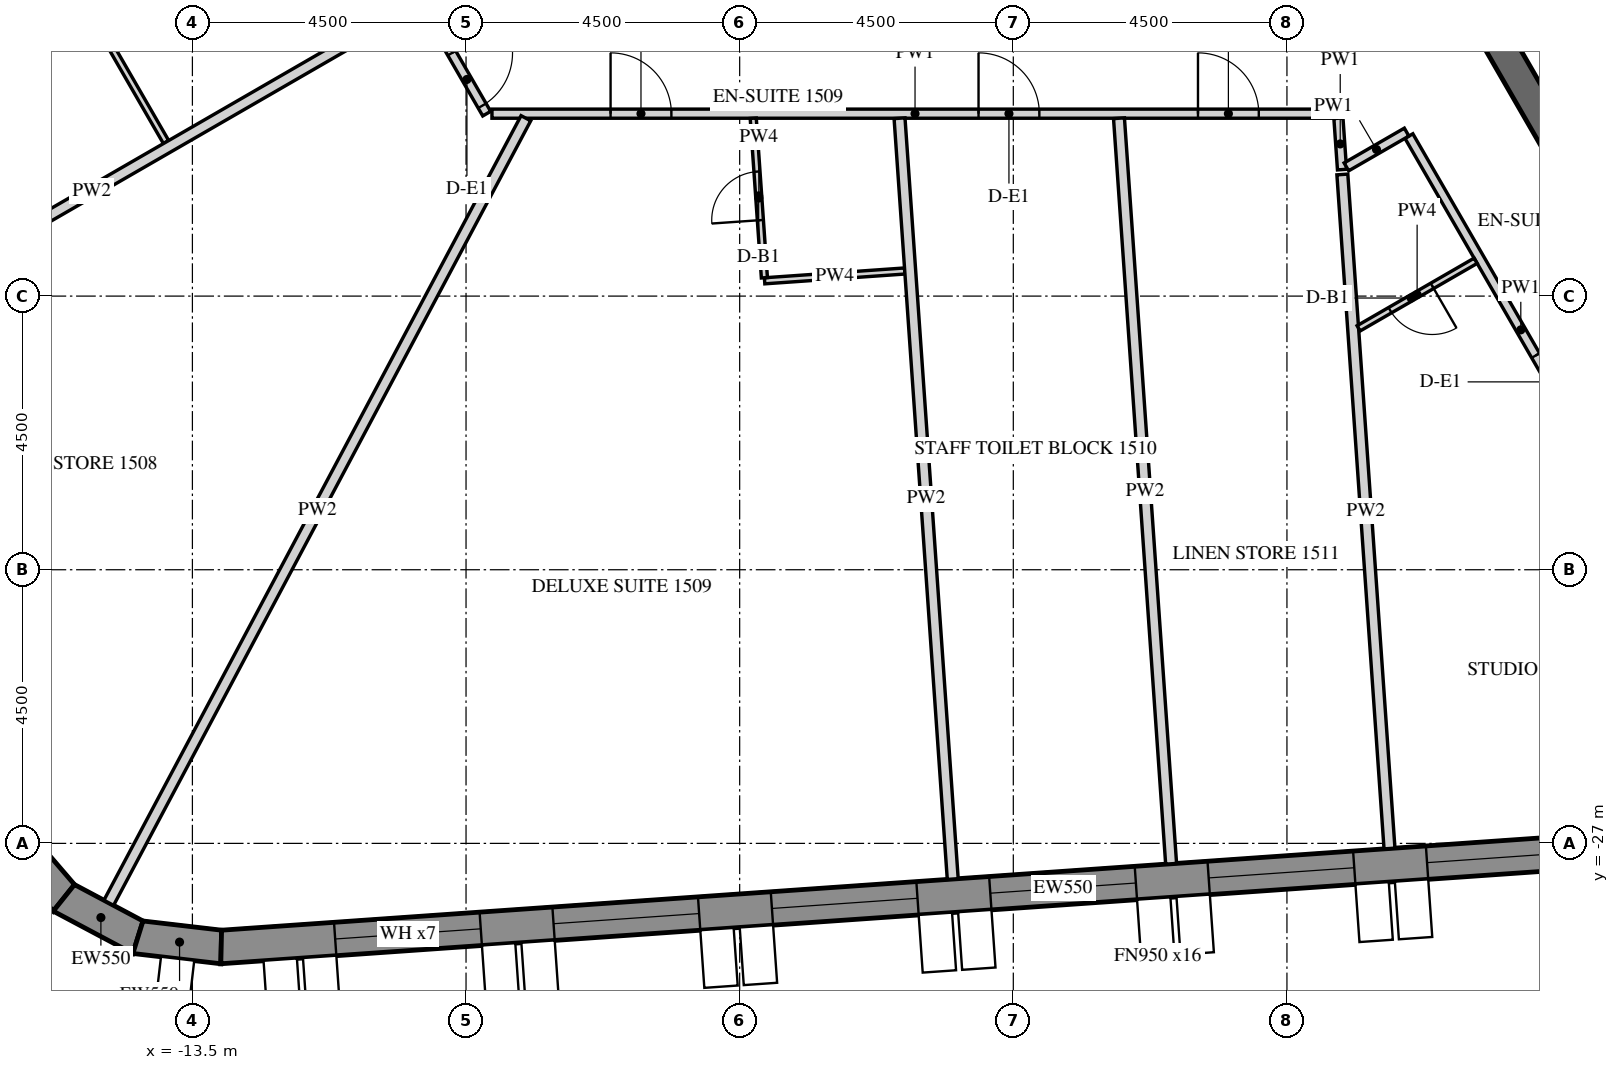
"""IFC4 building model, lengths in metres.
Left out: names, types, materials, properties, quantities, classifications, styles, units other than length and angle.
Written with IfcOpenShell. Run it as: python <this file> out.ifc"""

import sys

from ifc_helpers import new_model, si_unit, direction, frame, frame_2d, origin, place, context, subcontext, project, spatial, polyline, rectangle, outline, extrude, element, fill, save


model = new_model("IFC4")
c1 = context("Model", 3, precision=1e-05, world=origin(), true_north=direction((0.0, 1.0)))
c2 = subcontext(c1, "Body", "Model", "MODEL_VIEW")
j1 = project(units=[si_unit("LENGTHUNIT", "METRE"), si_unit("PLANEANGLEUNIT", "RADIAN")], contexts=[c1])
p1 = place(None, origin())
s1 = spatial("IfcSite", under=j1, at=p1, CompositionType="ELEMENT")
p2 = place(p1, origin())
s2 = spatial("IfcBuilding", under=s1, at=p2, CompositionType="ELEMENT")
p3 = place(p2, frame((0.0, 0.0, 195.6)))
s3 = spatial("IfcBuildingStorey", under=s2, at=p3, CompositionType="ELEMENT", Elevation=195.6)
p4 = place(p3, frame((-16.512, -26.85, -0.15), z_axis=(0.0, 0.0, 1.0), x_axis=(0.651621950847, -0.758543890078, 0.0)))
e1 = element("IfcWall", 1, at=p4, inside=s3, PredefinedType="SOLIDWALL", context=c2, shape_type="SweptSolid", body=[
    extrude(outline(polyline([(-0.026, -0.275), (1.431, -0.275), (1.327, 0.275), (0.026, 0.275), (-0.026, -0.275)])), origin(), (0.0, 0.0, 1.0), 3.9),
])
p5 = place(p3, frame((-15.614, -27.896, -0.15), z_axis=(0.0, 0.0, 1.0), x_axis=(0.882994189209, -0.469383917304, 0.0)))
e2 = element("IfcWall", 2, at=p5, inside=s3, PredefinedType="SOLIDWALL", context=c2, shape_type="SweptSolid", body=[
    extrude(outline(polyline([(-0.052, -0.275), (1.431, -0.275), (1.327, 0.275), (0.052, 0.275), (-0.052, -0.275)])), origin(), (0.0, 0.0, 1.0), 3.9),
])
p6 = place(p3, frame((-14.396, -28.543, -0.15), z_axis=(0.0, 0.0, 1.0), x_axis=(0.993232537394, -0.11614269956, 0.0)))
e3 = element("IfcWall", 3, at=p6, inside=s3, PredefinedType="SOLIDWALL", context=c2, shape_type="SweptSolid", body=[
    extrude(outline(polyline([(-0.052, -0.275), (1.405, -0.275), (1.353, 0.275), (0.052, 0.275), (-0.052, -0.275)])), origin(), (0.0, 0.0, 1.0), 3.9),
])
p7 = place(p3, frame((-13.026, -28.704, -0.15), z_axis=(0.0, 0.0, 1.0), x_axis=(0.99756406806, 0.069756219185, 0.0)))
e4 = element("IfcWall", 4, at=p7, inside=s3, PredefinedType="SOLIDWALL", context=c2, shape_type="SweptSolid", body=[
    extrude(outline(polyline([(-0.026, -0.275), (27.78, -0.275), (27.735, 0.275), (0.026, 0.275), (-0.026, -0.275)])), origin(), (0.0, 0.0, 1.0), 3.9),
])
p8 = place(p7, frame((1.879, 0.0, 1.05)))
e5 = element("IfcOpeningElement", 5, at=p8, cuts=e4, PredefinedType="OPENING", context=c2, shape_type="SweptSolid", body=[
    extrude(rectangle(XDim=2.4, YDim=2.4, at=frame_2d((1.2, 1.2))), frame((0.0, 0.285, 0.0), z_axis=(0.0, -1.0, 0.0), x_axis=(1.0, 0.0, 0.0)), (0.0, 0.0, 1.0), 0.57),
])
p9 = place(p7, frame((5.479, 0.0, 1.05)))
e6 = element("IfcOpeningElement", 6, at=p9, cuts=e4, PredefinedType="OPENING", context=c2, shape_type="SweptSolid", body=[
    extrude(rectangle(XDim=2.4, YDim=2.4, at=frame_2d((1.2, 1.2))), frame((0.0, 0.285, 0.0), z_axis=(0.0, -1.0, 0.0), x_axis=(1.0, 0.0, 0.0)), (0.0, 0.0, 1.0), 0.57),
])
p10 = place(p7, frame((9.079, 0.0, 1.05)))
e7 = element("IfcOpeningElement", 7, at=p10, cuts=e4, PredefinedType="OPENING", context=c2, shape_type="SweptSolid", body=[
    extrude(rectangle(XDim=2.4, YDim=2.4, at=frame_2d((1.2, 1.2))), frame((0.0, 0.285, 0.0), z_axis=(0.0, -1.0, 0.0), x_axis=(1.0, 0.0, 0.0)), (0.0, 0.0, 1.0), 0.57),
])
p11 = place(p7, frame((12.679, 0.0, 1.05)))
e8 = element("IfcOpeningElement", 8, at=p11, cuts=e4, PredefinedType="OPENING", context=c2, shape_type="SweptSolid", body=[
    extrude(rectangle(XDim=2.4, YDim=2.4, at=frame_2d((1.2, 1.2))), frame((0.0, 0.285, 0.0), z_axis=(0.0, -1.0, 0.0), x_axis=(1.0, 0.0, 0.0)), (0.0, 0.0, 1.0), 0.57),
])
p12 = place(p7, frame((16.279, 0.0, 1.05)))
e9 = element("IfcOpeningElement", 9, at=p12, cuts=e4, PredefinedType="OPENING", context=c2, shape_type="SweptSolid", body=[
    extrude(rectangle(XDim=2.4, YDim=2.4, at=frame_2d((1.2, 1.2))), frame((0.0, 0.285, 0.0), z_axis=(0.0, -1.0, 0.0), x_axis=(1.0, 0.0, 0.0)), (0.0, 0.0, 1.0), 0.57),
])
p13 = place(p7, frame((19.879, 0.0, 1.05)))
e10 = element("IfcOpeningElement", 10, at=p13, cuts=e4, PredefinedType="OPENING", context=c2, shape_type="SweptSolid", body=[
    extrude(rectangle(XDim=2.4, YDim=2.4, at=frame_2d((1.2, 1.2))), frame((0.0, 0.285, 0.0), z_axis=(0.0, -1.0, 0.0), x_axis=(1.0, 0.0, 0.0)), (0.0, 0.0, 1.0), 0.57),
])
p14 = place(p7, frame((23.479, 0.0, 1.05)))
e11 = element("IfcOpeningElement", 11, at=p14, cuts=e4, PredefinedType="OPENING", context=c2, shape_type="SweptSolid", body=[
    extrude(rectangle(XDim=2.4, YDim=2.4, at=frame_2d((1.2, 1.2))), frame((0.0, 0.285, 0.0), z_axis=(0.0, -1.0, 0.0), x_axis=(1.0, 0.0, 0.0)), (0.0, 0.0, 1.0), 0.57),
])
p15 = place(p3, frame((7.506, -13.0, -0.15), z_axis=(0.0, 0.0, 1.0), x_axis=(0.499988271576, -0.866032175087, 0.0)))
e12 = element("IfcWall", 12, at=p15, inside=s3, PredefinedType="SHEAR", context=c2, shape_type="SweptSolid", body=[
    extrude(rectangle(XDim=15.424, YDim=0.5, at=frame_2d((7.712, 0.0))), origin(), (0.0, 0.0, 1.0), 3.9),
])
p16 = place(p15, frame((6.812, 0.0, 0.15)))
e13 = element("IfcOpeningElement", 13, at=p16, cuts=e12, PredefinedType="OPENING", context=c2, shape_type="SweptSolid", body=[
    extrude(rectangle(XDim=1.8, YDim=2.4, at=frame_2d((0.9, 1.2))), frame((0.0, 0.26, 0.0), z_axis=(0.0, -1.0, 0.0), x_axis=(1.0, 0.0, 0.0)), (0.0, 0.0, 1.0), 0.52),
])
p17 = place(p3, frame((-15.094, -3.856, 0.0), z_axis=(0.0, 0.0, 1.0), x_axis=(0.500006037985, -0.866021917724, 0.0)))
e14 = element("IfcWall", 14, at=p17, inside=s3, PredefinedType="PARTITIONING", context=c2, shape_type="SweptSolid", body=[
    extrude(rectangle(XDim=12.867, YDim=0.15, at=frame_2d((6.434, 0.0))), origin(), (0.0, 0.0, 1.0), 2.988),
])
p18 = place(p17, frame((6.025, 0.0, 0.0)))
e15 = element("IfcOpeningElement", 15, at=p18, cuts=e14, PredefinedType="OPENING", context=c2, shape_type="SweptSolid", body=[
    extrude(rectangle(XDim=1.0, YDim=2.1, at=frame_2d((0.5, 1.05))), frame((0.0, 0.085, 0.0), z_axis=(0.0, -1.0, 0.0), x_axis=(1.0, 0.0, 0.0)), (0.0, 0.0, 1.0), 0.17),
])
p19 = place(p17, frame((11.717, 0.0, 0.0)))
e16 = element("IfcOpeningElement", 16, at=p19, cuts=e14, PredefinedType="OPENING", context=c2, shape_type="SweptSolid", body=[
    extrude(rectangle(XDim=1.0, YDim=2.1, at=frame_2d((0.5, 1.05))), frame((0.0, 0.085, 0.0), z_axis=(0.0, -1.0, 0.0), x_axis=(1.0, 0.0, 0.0)), (0.0, 0.0, 1.0), 0.17),
])
p20 = place(p3, frame((-8.574, -15.0, 0.0), z_axis=(0.0, 0.0, 1.0), x_axis=(1.0, 0.0, 0.0)))
e17 = element("IfcWall", 17, at=p20, inside=s3, PredefinedType="PARTITIONING", context=c2, shape_type="SweptSolid", body=[
    extrude(rectangle(XDim=13.915, YDim=0.15, at=frame_2d((6.958, 0.0))), origin(), (0.0, 0.0, 1.0), 2.988),
])
p21 = place(p20, frame((1.951, 0.0, 0.0)))
e18 = element("IfcOpeningElement", 18, at=p21, cuts=e17, PredefinedType="OPENING", context=c2, shape_type="SweptSolid", body=[
    extrude(rectangle(XDim=1.0, YDim=2.1, at=frame_2d((0.5, 1.05))), frame((0.0, 0.085, 0.0), z_axis=(0.0, -1.0, 0.0), x_axis=(1.0, 0.0, 0.0)), (0.0, 0.0, 1.0), 0.17),
])
p22 = place(p20, frame((8.002, 0.0, 0.0)))
e19 = element("IfcOpeningElement", 19, at=p22, cuts=e17, PredefinedType="OPENING", context=c2, shape_type="SweptSolid", body=[
    extrude(rectangle(XDim=1.0, YDim=2.1, at=frame_2d((0.5, 1.05))), frame((0.0, 0.085, 0.0), z_axis=(0.0, -1.0, 0.0), x_axis=(1.0, 0.0, 0.0)), (0.0, 0.0, 1.0), 0.17),
])
p23 = place(p20, frame((11.611, 0.0, 0.0)))
e20 = element("IfcOpeningElement", 20, at=p23, cuts=e17, PredefinedType="OPENING", context=c2, shape_type="SweptSolid", body=[
    extrude(rectangle(XDim=1.0, YDim=2.1, at=frame_2d((0.5, 1.05))), frame((0.0, 0.085, 0.0), z_axis=(0.0, -1.0, 0.0), x_axis=(1.0, 0.0, 0.0)), (0.0, 0.0, 1.0), 0.17),
])
p24 = place(p3, frame((5.347, -15.075, 0.0), z_axis=(0.0, 0.0, 1.0), x_axis=(0.069751684831, -0.997564385122, 0.0)))
e21 = element("IfcWall", 21, at=p24, inside=s3, PredefinedType="PARTITIONING", context=c2, shape_type="SweptSolid", body=[
    extrude(rectangle(XDim=0.847, YDim=0.15, at=frame_2d((0.423, 0.0))), origin(), (0.0, 0.0, 1.0), 2.988),
])
p25 = place(p3, frame((6.506, -15.368, 0.0), z_axis=(0.0, 0.0, 1.0), x_axis=(0.499995202058, -0.86602817386, 0.0)))
e22 = element("IfcWall", 22, at=p25, inside=s3, PredefinedType="PARTITIONING", context=c2, shape_type="SweptSolid", body=[
    extrude(rectangle(XDim=7.361, YDim=0.15, at=frame_2d((3.68, 0.0))), origin(), (0.0, 0.0, 1.0), 2.988),
])
p26 = place(p25, frame((4.168, 0.0, 0.0)))
e23 = element("IfcOpeningElement", 23, at=p26, cuts=e22, PredefinedType="OPENING", context=c2, shape_type="SweptSolid", body=[
    extrude(rectangle(XDim=1.0, YDim=2.1, at=frame_2d((0.5, 1.05))), frame((0.0, 0.085, 0.0), z_axis=(0.0, -1.0, 0.0), x_axis=(1.0, 0.0, 0.0)), (0.0, 0.0, 1.0), 0.17),
])
p27 = place(p3, frame((5.478, -15.875, 0.0), z_axis=(0.0, 0.0, 1.0), x_axis=(0.866000689289, 0.500042804318, 0.0)))
e24 = element("IfcWall", 24, at=p27, inside=s3, PredefinedType="PARTITIONING", context=c2, shape_type="SweptSolid", body=[
    extrude(rectangle(XDim=1.144, YDim=0.15, at=frame_2d((0.572, 0.0))), origin(), (0.0, 0.0, 1.0), 2.988),
])
p28 = place(p3, frame((-17.463, -9.353, 0.0), z_axis=(0.0, 0.0, 1.0), x_axis=(0.499995846692, -0.866027801685, 0.0)))
e25 = element("IfcWall", 25, at=p28, inside=s3, PredefinedType="PARTITIONING", context=c2, shape_type="SweptSolid", body=[
    extrude(rectangle(XDim=7.06, YDim=0.1, at=frame_2d((3.53, 0.0))), origin(), (0.0, 0.0, 1.0), 2.988),
])
p29 = place(p28, frame((3.1, 0.0, 0.0)))
e26 = element("IfcOpeningElement", 26, at=p29, cuts=e25, PredefinedType="OPENING", context=c2, shape_type="SweptSolid", body=[
    extrude(rectangle(XDim=0.9, YDim=2.1, at=frame_2d((0.45, 1.05))), frame((0.0, 0.06, 0.0), z_axis=(0.0, -1.0, 0.0), x_axis=(1.0, 0.0, 0.0)), (0.0, 0.0, 1.0), 0.12),
])
p30 = place(p3, frame((-20.513, -19.37, 0.0), z_axis=(0.0, 0.0, 1.0), x_axis=(0.866024931941, 0.500000817256, 0.0)))
e27 = element("IfcWall", 27, at=p30, inside=s3, PredefinedType="PARTITIONING", context=c2, shape_type="SweptSolid", body=[
    extrude(rectangle(XDim=12.375, YDim=0.18, at=frame_2d((6.188, 0.0))), origin(), (0.0, 0.0, 1.0), 2.988),
])
p31 = place(p3, frame((-14.876, -27.977, 0.0), z_axis=(0.0, 0.0, 1.0), x_axis=(0.469468328163, 0.882949312731, 0.0)))
e28 = element("IfcWall", 28, at=p31, inside=s3, PredefinedType="PARTITIONING", context=c2, shape_type="SweptSolid", body=[
    extrude(rectangle(XDim=14.613, YDim=0.18, at=frame_2d((7.306, 0.0))), origin(), (0.0, 0.0, 1.0), 2.988),
])
p32 = place(p3, frame((-1.785, -17.587, 0.0), z_axis=(0.0, 0.0, 1.0), x_axis=(-0.997564338377, -0.069752353356, 0.0)))
e29 = element("IfcWall", 29, at=p32, inside=s3, PredefinedType="PARTITIONING", context=c2, shape_type="SweptSolid", body=[
    extrude(rectangle(XDim=2.31, YDim=0.1, at=frame_2d((1.155, 0.0))), origin(), (0.0, 0.0, 1.0), 2.988),
])
p33 = place(p3, frame((-4.093, -17.698, 0.0), z_axis=(0.0, 0.0, 1.0), x_axis=(-0.069808804481, 0.997560389559, 0.0)))
e30 = element("IfcWall", 30, at=p33, inside=s3, PredefinedType="PARTITIONING", context=c2, shape_type="SweptSolid", body=[
    extrude(rectangle(XDim=2.63, YDim=0.1, at=frame_2d((1.315, 0.0))), origin(), (0.0, 0.0, 1.0), 2.988),
])
p34 = place(p33, frame((0.95, 0.0, 0.0)))
e31 = element("IfcOpeningElement", 31, at=p34, cuts=e30, PredefinedType="OPENING", context=c2, shape_type="SweptSolid", body=[
    extrude(rectangle(XDim=0.8, YDim=2.1, at=frame_2d((0.4, 1.05))), frame((0.0, 0.06, 0.0), z_axis=(0.0, -1.0, 0.0), x_axis=(1.0, 0.0, 0.0)), (0.0, 0.0, 1.0), 0.12),
])
p35 = place(p3, frame((-0.996, -27.587, 0.0), z_axis=(0.0, 0.0, 1.0), x_axis=(-0.069744671963, 0.997564875451, 0.0)))
e32 = element("IfcWall", 32, at=p35, inside=s3, PredefinedType="PARTITIONING", context=c2, shape_type="SweptSolid", body=[
    extrude(rectangle(XDim=12.542, YDim=0.18, at=frame_2d((6.271, 0.0))), origin(), (0.0, 0.0, 1.0), 2.988),
])
p36 = place(p3, frame((2.595, -27.335, 0.0), z_axis=(0.0, 0.0, 1.0), x_axis=(-0.069763302087, 0.997563572752, 0.0)))
e33 = element("IfcWall", 33, at=p36, inside=s3, PredefinedType="PARTITIONING", context=c2, shape_type="SweptSolid", body=[
    extrude(rectangle(XDim=12.291, YDim=0.18, at=frame_2d((6.145, 0.0))), origin(), (0.0, 0.0, 1.0), 2.988),
])
p37 = place(p3, frame((6.187, -27.084, 0.0), z_axis=(0.0, 0.0, 1.0), x_axis=(-0.069758943489, 0.997563877555, 0.0)))
e34 = element("IfcWall", 34, at=p37, inside=s3, PredefinedType="PARTITIONING", context=c2, shape_type="SweptSolid", body=[
    extrude(rectangle(XDim=11.112, YDim=0.18, at=frame_2d((5.556, 0.0))), origin(), (0.0, 0.0, 1.0), 2.988),
])
p38 = place(p3, frame((7.603, -17.419, 0.0), z_axis=(0.0, 0.0, 1.0), x_axis=(-0.866064858854, -0.499931655587, 0.0)))
e35 = element("IfcWall", 35, at=p38, inside=s3, PredefinedType="PARTITIONING", context=c2, shape_type="SweptSolid", body=[
    extrude(rectangle(XDim=2.222, YDim=0.1, at=frame_2d((1.111, 0.0))), origin(), (0.0, 0.0, 1.0), 2.988),
])
p39 = place(p38, frame((0.825, 0.0, 0.0)))
e36 = element("IfcOpeningElement", 36, at=p39, cuts=e35, PredefinedType="OPENING", context=c2, shape_type="SweptSolid", body=[
    extrude(rectangle(XDim=0.8, YDim=2.1, at=frame_2d((0.4, 1.05))), frame((0.0, 0.06, 0.0), z_axis=(0.0, -1.0, 0.0), x_axis=(1.0, 0.0, 0.0)), (0.0, 0.0, 1.0), 0.12),
])
p40 = place(p8, frame((0.0, 0.205, 0.0)))
e37 = element("IfcWindow", 37, at=p40, inside=s3, PartitioningType="DOUBLE_PANEL_VERTICAL", PredefinedType="WINDOW", context=c2, shape_type="SweptSolid", body=[
    extrude(rectangle(XDim=2.4, YDim=2.4, at=frame_2d((1.2, 1.2))), frame((0.0, 0.03, 0.0), z_axis=(0.0, -1.0, 0.0), x_axis=(1.0, 0.0, 0.0)), (0.0, 0.0, 1.0), 0.06),
])
fill(e5, e37)
p41 = place(p9, frame((0.0, 0.205, 0.0)))
e38 = element("IfcWindow", 38, at=p41, inside=s3, PartitioningType="DOUBLE_PANEL_VERTICAL", PredefinedType="WINDOW", context=c2, shape_type="SweptSolid", body=[
    extrude(rectangle(XDim=2.4, YDim=2.4, at=frame_2d((1.2, 1.2))), frame((0.0, 0.03, 0.0), z_axis=(0.0, -1.0, 0.0), x_axis=(1.0, 0.0, 0.0)), (0.0, 0.0, 1.0), 0.06),
])
fill(e6, e38)
p42 = place(p10, frame((0.0, 0.205, 0.0)))
e39 = element("IfcWindow", 39, at=p42, inside=s3, PartitioningType="DOUBLE_PANEL_VERTICAL", PredefinedType="WINDOW", context=c2, shape_type="SweptSolid", body=[
    extrude(rectangle(XDim=2.4, YDim=2.4, at=frame_2d((1.2, 1.2))), frame((0.0, 0.03, 0.0), z_axis=(0.0, -1.0, 0.0), x_axis=(1.0, 0.0, 0.0)), (0.0, 0.0, 1.0), 0.06),
])
fill(e7, e39)
p43 = place(p11, frame((0.0, 0.205, 0.0)))
e40 = element("IfcWindow", 40, at=p43, inside=s3, PartitioningType="DOUBLE_PANEL_VERTICAL", PredefinedType="WINDOW", context=c2, shape_type="SweptSolid", body=[
    extrude(rectangle(XDim=2.4, YDim=2.4, at=frame_2d((1.2, 1.2))), frame((0.0, 0.03, 0.0), z_axis=(0.0, -1.0, 0.0), x_axis=(1.0, 0.0, 0.0)), (0.0, 0.0, 1.0), 0.06),
])
fill(e8, e40)
p44 = place(p12, frame((0.0, 0.205, 0.0)))
e41 = element("IfcWindow", 41, at=p44, inside=s3, PartitioningType="DOUBLE_PANEL_VERTICAL", PredefinedType="WINDOW", context=c2, shape_type="SweptSolid", body=[
    extrude(rectangle(XDim=2.4, YDim=2.4, at=frame_2d((1.2, 1.2))), frame((0.0, 0.03, 0.0), z_axis=(0.0, -1.0, 0.0), x_axis=(1.0, 0.0, 0.0)), (0.0, 0.0, 1.0), 0.06),
])
fill(e9, e41)
p45 = place(p13, frame((0.0, 0.205, 0.0)))
e42 = element("IfcWindow", 42, at=p45, inside=s3, PartitioningType="DOUBLE_PANEL_VERTICAL", PredefinedType="WINDOW", context=c2, shape_type="SweptSolid", body=[
    extrude(rectangle(XDim=2.4, YDim=2.4, at=frame_2d((1.2, 1.2))), frame((0.0, 0.03, 0.0), z_axis=(0.0, -1.0, 0.0), x_axis=(1.0, 0.0, 0.0)), (0.0, 0.0, 1.0), 0.06),
])
fill(e10, e42)
p46 = place(p19, origin())
e43 = element("IfcDoor", 43, at=p46, inside=s3, OperationType="SINGLE_SWING_LEFT", PredefinedType="DOOR", context=c2, shape_type="SweptSolid", body=[
    extrude(rectangle(XDim=1.0, YDim=2.1, at=frame_2d((0.5, 1.05))), frame((0.0, 0.025, 0.0), z_axis=(0.0, -1.0, 0.0), x_axis=(1.0, 0.0, 0.0)), (0.0, 0.0, 1.0), 0.05),
])
fill(e16, e43)
p47 = place(p21, origin())
e44 = element("IfcDoor", 44, at=p47, inside=s3, OperationType="SINGLE_SWING_LEFT", PredefinedType="DOOR", context=c2, shape_type="SweptSolid", body=[
    extrude(rectangle(XDim=1.0, YDim=2.1, at=frame_2d((0.5, 1.05))), frame((0.0, 0.025, 0.0), z_axis=(0.0, -1.0, 0.0), x_axis=(1.0, 0.0, 0.0)), (0.0, 0.0, 1.0), 0.05),
])
fill(e18, e44)
p48 = place(p34, origin())
e45 = element("IfcDoor", 45, at=p48, inside=s3, OperationType="SINGLE_SWING_LEFT", PredefinedType="DOOR", context=c2, shape_type="SweptSolid", body=[
    extrude(rectangle(XDim=0.8, YDim=2.1, at=frame_2d((0.4, 1.05))), frame((0.0, 0.025, 0.0), z_axis=(0.0, -1.0, 0.0), x_axis=(1.0, 0.0, 0.0)), (0.0, 0.0, 1.0), 0.05),
])
fill(e31, e45)
p49 = place(p22, origin())
e46 = element("IfcDoor", 46, at=p49, inside=s3, OperationType="SINGLE_SWING_RIGHT", PredefinedType="DOOR", context=c2, shape_type="SweptSolid", body=[
    extrude(rectangle(XDim=1.0, YDim=2.1, at=frame_2d((0.5, 1.05))), frame((0.0, 0.025, 0.0), z_axis=(0.0, -1.0, 0.0), x_axis=(1.0, 0.0, 0.0)), (0.0, 0.0, 1.0), 0.05),
])
fill(e19, e46)
p50 = place(p23, origin())
e47 = element("IfcDoor", 47, at=p50, inside=s3, OperationType="SINGLE_SWING_RIGHT", PredefinedType="DOOR", context=c2, shape_type="SweptSolid", body=[
    extrude(rectangle(XDim=1.0, YDim=2.1, at=frame_2d((0.5, 1.05))), frame((0.0, 0.025, 0.0), z_axis=(0.0, -1.0, 0.0), x_axis=(1.0, 0.0, 0.0)), (0.0, 0.0, 1.0), 0.05),
])
fill(e20, e47)
p51 = place(p26, origin())
e48 = element("IfcDoor", 48, at=p51, inside=s3, OperationType="SINGLE_SWING_RIGHT", PredefinedType="DOOR", context=c2, shape_type="SweptSolid", body=[
    extrude(rectangle(XDim=1.0, YDim=2.1, at=frame_2d((0.5, 1.05))), frame((0.0, 0.025, 0.0), z_axis=(0.0, -1.0, 0.0), x_axis=(1.0, 0.0, 0.0)), (0.0, 0.0, 1.0), 0.05),
])
fill(e23, e48)
p52 = place(p39, origin())
e49 = element("IfcDoor", 49, at=p52, inside=s3, OperationType="SINGLE_SWING_LEFT", PredefinedType="DOOR", context=c2, shape_type="SweptSolid", body=[
    extrude(rectangle(XDim=0.8, YDim=2.1, at=frame_2d((0.4, 1.05))), frame((0.0, 0.025, 0.0), z_axis=(0.0, -1.0, 0.0), x_axis=(1.0, 0.0, 0.0)), (0.0, 0.0, 1.0), 0.05),
])
fill(e36, e49)
save(model, sys.argv[1])
